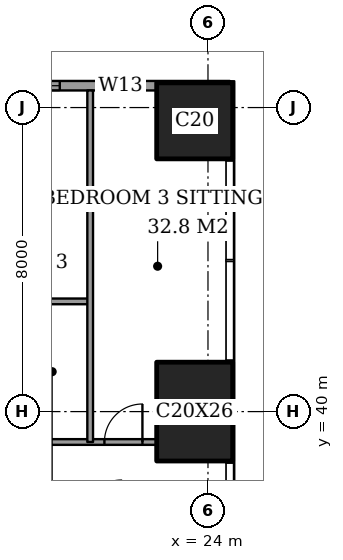
"""IFC4 building model, lengths in metres.
Left out: names, types, materials, properties, quantities, classifications, styles, units other than length and angle.
Written with IfcOpenShell. Run it as: python <this file> out.ifc"""

import sys

from ifc_helpers import new_model, si_unit, direction, frame, frame_2d, origin, origin_2d, place, context, subcontext, project, spatial, rectangle, extrude, element, fill, save


model = new_model("IFC4")
c1 = context("Model", 3, precision=1e-05, world=origin(), true_north=direction((0.0, 1.0)))
c2 = subcontext(c1, "Body", "Model", "MODEL_VIEW")
j1 = project(units=[si_unit("LENGTHUNIT", "METRE"), si_unit("PLANEANGLEUNIT", "RADIAN")], contexts=[c1])
p1 = place(None, origin())
s1 = spatial("IfcSite", under=j1, at=p1, CompositionType="ELEMENT")
p2 = place(p1, origin())
s2 = spatial("IfcBuilding", under=s1, at=p2, CompositionType="ELEMENT")
p3 = place(p2, frame((0.0, 0.0, 207.4)))
s3 = spatial("IfcBuildingStorey", under=s2, at=p3, CompositionType="ELEMENT", Elevation=207.4)
p4 = place(p3, frame((23.65, 40.0, 0.0), z_axis=(0.0, 0.0, 1.0), x_axis=(1.0, 0.0, 0.0)))
e1 = element("IfcColumn", 1, at=p4, inside=s3, PredefinedType="COLUMN", context=c2, shape_type="SweptSolid", body=[
    extrude(rectangle(XDim=2.0, YDim=2.6, at=origin_2d()), origin(), (0.0, 0.0, 1.0), 3.6),
])
p5 = place(p3, frame((23.65, 47.65, 0.0), z_axis=(0.0, 0.0, 1.0), x_axis=(1.0, 0.0, 0.0)))
e2 = element("IfcColumn", 2, at=p5, inside=s3, PredefinedType="COLUMN", context=c2, shape_type="SweptSolid", body=[
    extrude(rectangle(XDim=2.0, YDim=2.0, at=origin_2d()), origin(), (0.0, 0.0, 1.0), 3.6),
])
p6 = place(p3, frame((24.575, 48.575, 0.0), z_axis=(0.0, 0.0, 1.0), x_axis=(-1.0, 0.0, 0.0)))
e3 = element("IfcWall", 3, at=p6, inside=s3, PredefinedType="SOLIDWALL", context=c2, shape_type="SweptSolid", body=[
    extrude(rectangle(XDim=21.4, YDim=0.25, at=frame_2d((10.7, 0.0))), origin(), (0.0, 0.0, 1.0), 3.6),
])
p7 = place(p6, frame((2.275, 0.0, 0.2)))
e4 = element("IfcOpeningElement", 4, at=p7, cuts=e3, PredefinedType="OPENING", context=c2, shape_type="SweptSolid", body=[
    extrude(rectangle(XDim=1.2, YDim=2.4, at=frame_2d((0.6, 1.2))), frame((0.0, 0.135, 0.0), z_axis=(0.0, -1.0, 0.0), x_axis=(1.0, 0.0, 0.0)), (0.0, 0.0, 1.0), 0.27),
])
p8 = place(p6, frame((4.475, 0.0, 0.2)))
e5 = element("IfcOpeningElement", 5, at=p8, cuts=e3, PredefinedType="OPENING", context=c2, shape_type="SweptSolid", body=[
    extrude(rectangle(XDim=2.4, YDim=2.4, at=frame_2d((1.2, 1.2))), frame((0.0, 0.135, 0.0), z_axis=(0.0, -1.0, 0.0), x_axis=(1.0, 0.0, 0.0)), (0.0, 0.0, 1.0), 0.27),
])
p9 = place(p6, frame((10.4, 0.0, 0.2)))
e6 = element("IfcOpeningElement", 6, at=p9, cuts=e3, PredefinedType="OPENING", context=c2, shape_type="SweptSolid", body=[
    extrude(rectangle(XDim=1.2, YDim=2.4, at=frame_2d((0.6, 1.2))), frame((0.0, 0.135, 0.0), z_axis=(0.0, -1.0, 0.0), x_axis=(1.0, 0.0, 0.0)), (0.0, 0.0, 1.0), 0.27),
])
p10 = place(p6, frame((12.525, 0.0, 0.2)))
e7 = element("IfcOpeningElement", 7, at=p10, cuts=e3, PredefinedType="OPENING", context=c2, shape_type="SweptSolid", body=[
    extrude(rectangle(XDim=2.4, YDim=2.4, at=frame_2d((1.2, 1.2))), frame((0.0, 0.135, 0.0), z_axis=(0.0, -1.0, 0.0), x_axis=(1.0, 0.0, 0.0)), (0.0, 0.0, 1.0), 0.27),
])
p11 = place(p6, frame((17.8, 0.0, 0.2)))
e8 = element("IfcOpeningElement", 8, at=p11, cuts=e3, PredefinedType="OPENING", context=c2, shape_type="SweptSolid", body=[
    extrude(rectangle(XDim=0.6, YDim=2.4, at=frame_2d((0.3, 1.2))), frame((0.0, 0.135, 0.0), z_axis=(0.0, -1.0, 0.0), x_axis=(1.0, 0.0, 0.0)), (0.0, 0.0, 1.0), 0.27),
])
p12 = place(p6, frame((19.325, 0.0, 0.2)))
e9 = element("IfcOpeningElement", 9, at=p12, cuts=e3, PredefinedType="OPENING", context=c2, shape_type="SweptSolid", body=[
    extrude(rectangle(XDim=1.2, YDim=2.4, at=frame_2d((0.6, 1.2))), frame((0.0, 0.135, 0.0), z_axis=(0.0, -1.0, 0.0), x_axis=(1.0, 0.0, 0.0)), (0.0, 0.0, 1.0), 0.27),
])
p13 = place(p3, frame((16.9, 39.2, 0.0), z_axis=(0.0, 0.0, 1.0), x_axis=(1.0, 0.0, 0.0)))
e10 = element("IfcWall", 10, at=p13, inside=s3, PredefinedType="PARTITIONING", context=c2, shape_type="SweptSolid", body=[
    extrude(rectangle(XDim=5.75, YDim=0.15, at=frame_2d((2.875, 0.0))), origin(), (0.0, 0.0, 1.0), 3.35),
])
p14 = place(p13, frame((0.5, 0.0, 0.0)))
e11 = element("IfcOpeningElement", 11, at=p14, cuts=e10, PredefinedType="OPENING", context=c2, shape_type="SweptSolid", body=[
    extrude(rectangle(XDim=1.0, YDim=2.1, at=frame_2d((0.5, 1.05))), frame((0.0, 0.085, 0.0), z_axis=(0.0, -1.0, 0.0), x_axis=(1.0, 0.0, 0.0)), (0.0, 0.0, 1.0), 0.17),
])
p15 = place(p13, frame((4.375, 0.0, 0.0)))
e12 = element("IfcOpeningElement", 12, at=p15, cuts=e10, PredefinedType="OPENING", context=c2, shape_type="SweptSolid", body=[
    extrude(rectangle(XDim=1.0, YDim=2.1, at=frame_2d((0.5, 1.05))), frame((0.0, 0.085, 0.0), z_axis=(0.0, -1.0, 0.0), x_axis=(1.0, 0.0, 0.0)), (0.0, 0.0, 1.0), 0.17),
])
p16 = place(p3, frame((18.9, 42.9, 0.0), z_axis=(0.0, 0.0, 1.0), x_axis=(1.0, 0.0, 0.0)))
e13 = element("IfcWall", 13, at=p16, inside=s3, PredefinedType="PARTITIONING", context=c2, shape_type="SweptSolid", body=[
    extrude(rectangle(XDim=2.0, YDim=0.15, at=frame_2d((1.0, 0.0))), origin(), (0.0, 0.0, 1.0), 3.35),
])
p17 = place(p3, frame((20.9, 39.2, 0.0), z_axis=(0.0, 0.0, 1.0), x_axis=(0.0, 1.0, 0.0)))
e14 = element("IfcWall", 14, at=p17, inside=s3, PredefinedType="PARTITIONING", context=c2, shape_type="SweptSolid", body=[
    extrude(rectangle(XDim=9.25, YDim=0.15, at=frame_2d((4.625, 0.0))), origin(), (0.0, 0.0, 1.0), 3.35),
])
p18 = place(p7, origin())
e15 = element("IfcWindow", 15, at=p18, inside=s3, PartitioningType="SINGLE_PANEL", PredefinedType="WINDOW", context=c2, shape_type="SweptSolid", body=[
    extrude(rectangle(XDim=1.2, YDim=2.4, at=frame_2d((0.6, 1.2))), frame((0.0, 0.03, 0.0), z_axis=(0.0, -1.0, 0.0), x_axis=(1.0, 0.0, 0.0)), (0.0, 0.0, 1.0), 0.06),
])
fill(e4, e15)
p19 = place(p8, origin())
e16 = element("IfcWindow", 16, at=p19, inside=s3, PartitioningType="SINGLE_PANEL", PredefinedType="WINDOW", context=c2, shape_type="SweptSolid", body=[
    extrude(rectangle(XDim=2.4, YDim=2.4, at=frame_2d((1.2, 1.2))), frame((0.0, 0.03, 0.0), z_axis=(0.0, -1.0, 0.0), x_axis=(1.0, 0.0, 0.0)), (0.0, 0.0, 1.0), 0.06),
])
fill(e5, e16)
p20 = place(p15, origin())
e17 = element("IfcDoor", 17, at=p20, inside=s3, OperationType="SINGLE_SWING_LEFT", PredefinedType="DOOR", context=c2, shape_type="SweptSolid", body=[
    extrude(rectangle(XDim=1.0, YDim=2.1, at=frame_2d((0.5, 1.05))), frame((0.0, 0.025, 0.0), z_axis=(0.0, -1.0, 0.0), x_axis=(1.0, 0.0, 0.0)), (0.0, 0.0, 1.0), 0.05),
])
fill(e12, e17)
save(model, sys.argv[1])
